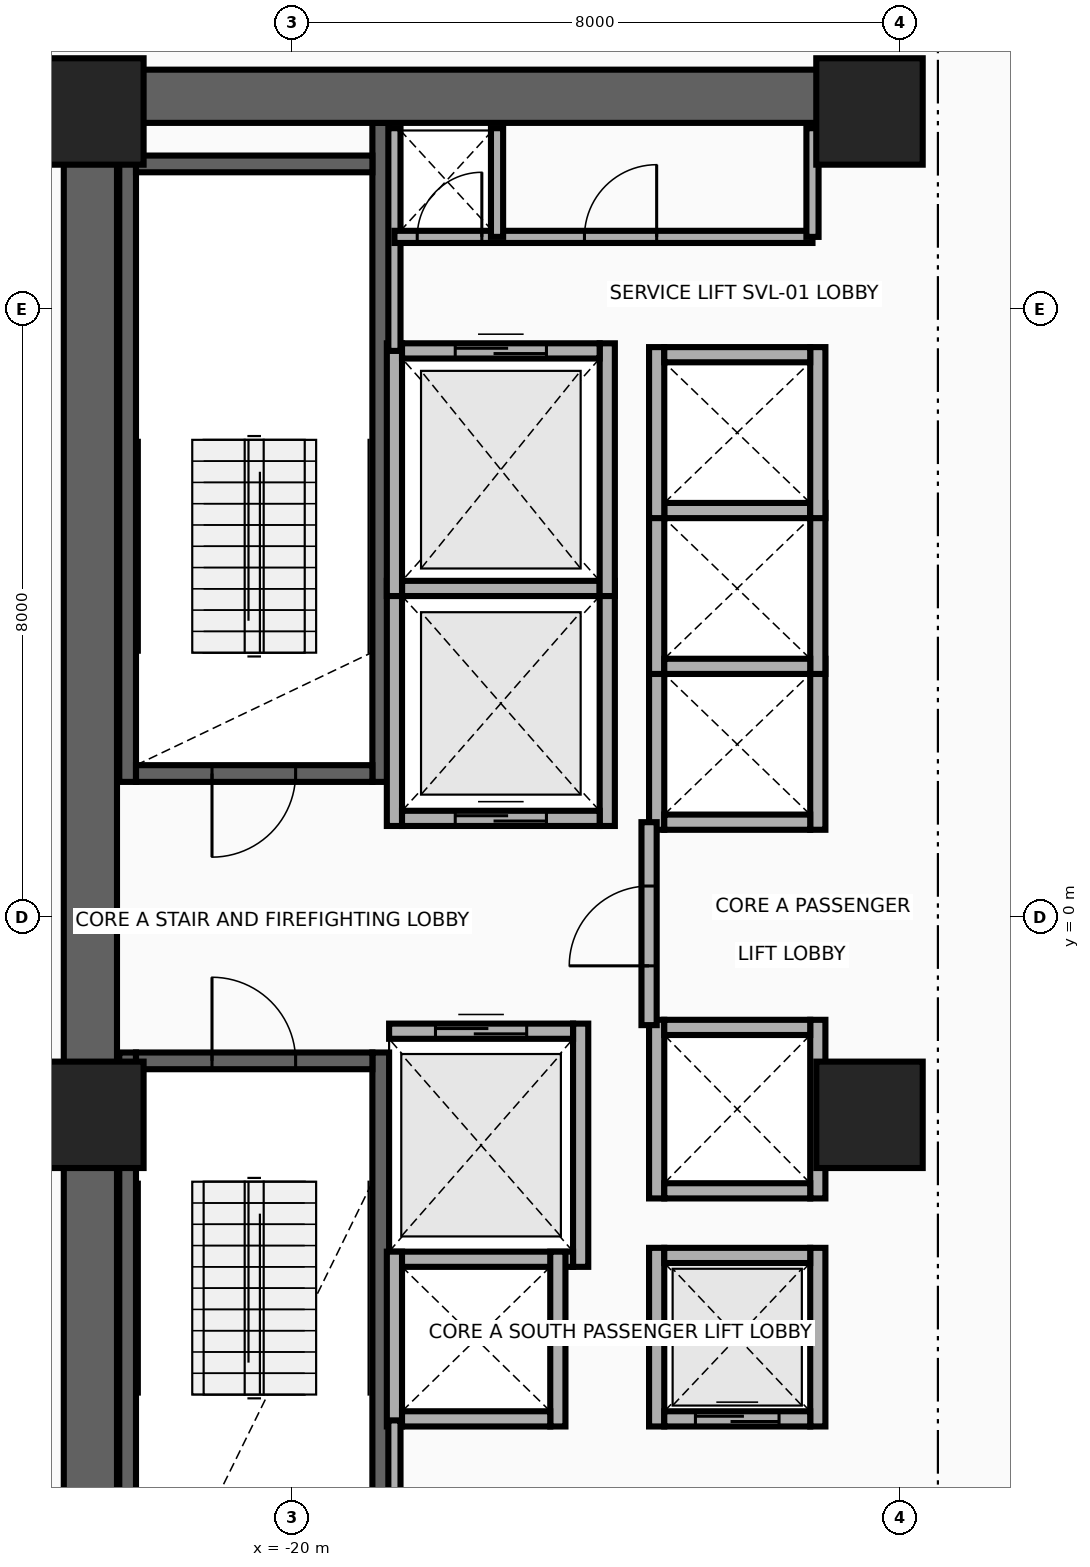
"""IFC4 building model, lengths in metres.
Left out: names, types, materials, properties, quantities, classifications, styles, units other than length and angle.
Written with IfcOpenShell. Run it as: python <this file> out.ifc"""

import sys

from ifc_helpers import new_model, si_unit, direction, frame, frame_2d, origin, origin_2d, place, context, subcontext, project, spatial, rectangle, extrude, source, transform, mapped, element, fill, save


model = new_model("IFC4")
c1 = context("Model", 3, precision=1e-05, world=origin(), true_north=direction((0.0, 1.0)))
c2 = subcontext(c1, "Body", "Model", "MODEL_VIEW")
j1 = project(units=[si_unit("LENGTHUNIT", "METRE"), si_unit("PLANEANGLEUNIT", "RADIAN")], contexts=[c1])
p1 = place(None, origin())
s1 = spatial("IfcSite", under=j1, at=p1, CompositionType="ELEMENT")
p2 = place(p1, origin())
s2 = spatial("IfcBuilding", under=s1, at=p2, CompositionType="ELEMENT")
p3 = place(p2, frame((0.0, 0.0, 81.5)))
s3 = spatial("IfcBuildingStorey", under=s2, at=p3, CompositionType="ELEMENT", Elevation=81.5)
for number, where, z_axis, x_axis in (
    (1, (-22.16, 1.78, 0.0), (0.0, 0.0, 1.0), (0.0, 1.0, 0.0)),
    (2, (-18.83, 1.78, 0.0), (0.0, 0.0, 1.0), (0.0, 1.0, 0.0)),
):
    element("IfcWall", number, at=place(p3, frame(where, z_axis=z_axis, x_axis=x_axis)), inside=s3, PredefinedType="SHEAR", context=c2, shape_type="SweptSolid", body=[
        extrude(rectangle(XDim=8.67, YDim=0.22, at=frame_2d((4.335, 0.0))), origin(), (0.0, 0.0, 1.0), 3.46),
    ])
p4 = place(p3, frame((-22.05, 1.89, 0.0), z_axis=(0.0, 0.0, 1.0), x_axis=(1.0, 0.0, 0.0)))
e3 = element("IfcWall", 3, at=p4, inside=s3, PredefinedType="SHEAR", context=c2, shape_type="SweptSolid", body=[
    extrude(rectangle(XDim=3.11, YDim=0.22, at=frame_2d((1.555, 0.0))), origin(), (0.0, 0.0, 1.0), 3.46),
])
p5 = place(p4, frame((1.0, 0.0, 0.0)))
e4 = element("IfcOpeningElement", 4, at=p5, cuts=e3, PredefinedType="OPENING", context=c2, shape_type="SweptSolid", body=[
    extrude(rectangle(XDim=1.1, YDim=2.15, at=frame_2d((0.55, 1.075))), frame((0.0, 0.125, 0.0), z_axis=(0.0, -1.0, 0.0), x_axis=(1.0, 0.0, 0.0)), (0.0, 0.0, 1.0), 0.25),
])
p6 = place(p3, frame((-22.05, 9.91, 0.0), z_axis=(0.0, 0.0, 1.0), x_axis=(1.0, 0.0, 0.0)))
e5 = element("IfcWall", 5, at=p6, inside=s3, PredefinedType="SHEAR", context=c2, shape_type="SweptSolid", body=[
    extrude(rectangle(XDim=3.11, YDim=0.22, at=frame_2d((1.555, 0.0))), origin(), (0.0, 0.0, 1.0), 3.46),
])
for number, where, z_axis, x_axis in (
    (6, (-22.16, -10.45, 0.0), (0.0, 0.0, 1.0), (0.0, 1.0, 0.0)),
    (7, (-18.83, -10.45, 0.0), (0.0, 0.0, 1.0), (0.0, 1.0, 0.0)),
):
    element("IfcWall", number, at=place(p3, frame(where, z_axis=z_axis, x_axis=x_axis)), inside=s3, PredefinedType="SHEAR", context=c2, shape_type="SweptSolid", body=[
        extrude(rectangle(XDim=8.67, YDim=0.22, at=frame_2d((4.335, 0.0))), origin(), (0.0, 0.0, 1.0), 3.46),
    ])
p7 = place(p3, frame((-22.05, -1.89, 0.0), z_axis=(0.0, 0.0, 1.0), x_axis=(1.0, 0.0, 0.0)))
e8 = element("IfcWall", 8, at=p7, inside=s3, PredefinedType="SHEAR", context=c2, shape_type="SweptSolid", body=[
    extrude(rectangle(XDim=3.11, YDim=0.22, at=frame_2d((1.555, 0.0))), origin(), (0.0, 0.0, 1.0), 3.46),
])
p8 = place(p7, frame((1.0, 0.0, 0.0)))
e9 = element("IfcOpeningElement", 9, at=p8, cuts=e8, PredefinedType="OPENING", context=c2, shape_type="SweptSolid", body=[
    extrude(rectangle(XDim=1.1, YDim=2.15, at=frame_2d((0.55, 1.075))), frame((0.0, 0.125, 0.0), z_axis=(0.0, -1.0, 0.0), x_axis=(1.0, 0.0, 0.0)), (0.0, 0.0, 1.0), 0.25),
])
p9 = place(p3, frame((-22.65, -11.15, 0.0), z_axis=(0.0, 0.0, 1.0), x_axis=(0.0, 1.0, 0.0)))
e10 = element("IfcWall", 10, at=p9, inside=s3, PredefinedType="SHEAR", context=c2, shape_type="SweptSolid", body=[
    extrude(rectangle(XDim=22.3, YDim=0.7, at=frame_2d((11.15, 0.0))), origin(), (0.0, 0.0, 1.0), 3.46),
])
p10 = place(p3, frame((-22.65, 10.8, 0.0), z_axis=(0.0, 0.0, 1.0), x_axis=(1.0, 0.0, 0.0)))
e11 = element("IfcWall", 11, at=p10, inside=s3, PredefinedType="SHEAR", context=c2, shape_type="SweptSolid", body=[
    extrude(rectangle(XDim=10.25, YDim=0.7, at=frame_2d((5.125, 0.0))), origin(), (0.0, 0.0, 1.0), 3.46),
])
m1 = source(origin(), c2, "Body", "SweptSolid", [
    extrude(rectangle(XDim=1.4, YDim=1.4, at=origin_2d()), origin(), (0.0, 0.0, 1.0), 3.7),
])
for number, where, z_axis, x_axis in (
    (12, (-22.65, -2.6, 0.0), (0.0, 0.0, 1.0), (1.0, 0.0, 0.0)),
    (13, (-12.4, -2.6, 0.0), (0.0, 0.0, 1.0), (1.0, 0.0, 0.0)),
    (14, (-22.65, 10.6, 0.0), (0.0, 0.0, 1.0), (1.0, 0.0, 0.0)),
    (15, (-12.4, 10.6, 0.0), (0.0, 0.0, 1.0), (1.0, 0.0, 0.0)),
):
    element("IfcColumn", number, at=place(p3, frame(where, z_axis=z_axis, x_axis=x_axis)), inside=s3, PredefinedType="COLUMN", context=c2, shape_type="MappedRepresentation", body=[
        mapped(m1, transform((0.0, 0.0, 0.0), x_axis=(1.0, 0.0, 0.0), y_axis=(0.0, 1.0, 0.0), z_axis=(0.0, 0.0, 1.0), scale=1.0)),
    ])
for number, where, z_axis, x_axis in (
    (16, (-18.65, 1.2, 0.0), (0.0, 0.0, 1.0), (0.0, 1.0, 0.0)),
    (17, (-15.85, 1.2, 0.0), (0.0, 0.0, 1.0), (0.0, 1.0, 0.0)),
):
    element("IfcWall", number, at=place(p3, frame(where, z_axis=z_axis, x_axis=x_axis)), inside=s3, PredefinedType="MOVABLE", context=c2, shape_type="SweptSolid", body=[
        extrude(rectangle(XDim=3.225, YDim=0.2, at=frame_2d((1.613, 0.0))), origin(), (0.0, 0.0, 1.0), 3.46),
    ])
p11 = place(p3, frame((-18.55, 1.3, 0.0), z_axis=(0.0, 0.0, 1.0), x_axis=(1.0, 0.0, 0.0)))
e18 = element("IfcWall", 18, at=p11, inside=s3, PredefinedType="MOVABLE", context=c2, shape_type="SweptSolid", body=[
    extrude(rectangle(XDim=2.6, YDim=0.2, at=frame_2d((1.3, 0.0))), origin(), (0.0, 0.0, 1.0), 3.46),
])
p12 = place(p11, frame((0.7, 0.0, 0.0)))
e19 = element("IfcOpeningElement", 19, at=p12, cuts=e18, PredefinedType="OPENING", context=c2, shape_type="SweptSolid", body=[
    extrude(rectangle(XDim=1.2, YDim=2.1, at=frame_2d((0.6, 1.05))), frame((0.0, 0.115, 0.0), z_axis=(0.0, -1.0, 0.0), x_axis=(1.0, 0.0, 0.0)), (0.0, 0.0, 1.0), 0.23),
])
p13 = place(p3, frame((-18.55, 4.325, 0.0), z_axis=(0.0, 0.0, 1.0), x_axis=(1.0, 0.0, 0.0)))
e20 = element("IfcWall", 20, at=p13, inside=s3, PredefinedType="MOVABLE", context=c2, shape_type="SweptSolid", body=[
    extrude(rectangle(XDim=2.6, YDim=0.2, at=frame_2d((1.3, 0.0))), origin(), (0.0, 0.0, 1.0), 3.46),
])
p14 = place(p3, frame((-16.2, -4.6, 0.0), z_axis=(0.0, 0.0, 1.0), x_axis=(0.0, 1.0, 0.0)))
e21 = element("IfcWall", 21, at=p14, inside=s3, PredefinedType="MOVABLE", context=c2, shape_type="SweptSolid", body=[
    extrude(rectangle(XDim=3.2, YDim=0.2, at=frame_2d((1.6, 0.0))), origin(), (0.0, 0.0, 1.0), 3.46),
])
p15 = place(p3, frame((-18.72, -4.5, 0.0), z_axis=(0.0, 0.0, 1.0), x_axis=(1.0, 0.0, 0.0)))
e22 = element("IfcWall", 22, at=p15, inside=s3, PredefinedType="MOVABLE", context=c2, shape_type="SweptSolid", body=[
    extrude(rectangle(XDim=2.42, YDim=0.2, at=frame_2d((1.21, 0.0))), origin(), (0.0, 0.0, 1.0), 3.46),
])
p16 = place(p3, frame((-18.72, -1.5, 0.0), z_axis=(0.0, 0.0, 1.0), x_axis=(1.0, 0.0, 0.0)))
e23 = element("IfcWall", 23, at=p16, inside=s3, PredefinedType="MOVABLE", context=c2, shape_type="SweptSolid", body=[
    extrude(rectangle(XDim=2.42, YDim=0.2, at=frame_2d((1.21, 0.0))), origin(), (0.0, 0.0, 1.0), 3.46),
])
p17 = place(p16, frame((0.61, 0.0, 0.0)))
e24 = element("IfcOpeningElement", 24, at=p17, cuts=e23, PredefinedType="OPENING", context=c2, shape_type="SweptSolid", body=[
    extrude(rectangle(XDim=1.2, YDim=2.1, at=frame_2d((0.6, 1.05))), frame((0.0, 0.115, 0.0), z_axis=(0.0, -1.0, 0.0), x_axis=(1.0, 0.0, 0.0)), (0.0, 0.0, 1.0), 0.23),
])
for number, where, z_axis, x_axis in (
    (25, (-18.65, 4.225, 0.0), (0.0, 0.0, 1.0), (0.0, 1.0, 0.0)),
    (26, (-15.85, 4.225, 0.0), (0.0, 0.0, 1.0), (0.0, 1.0, 0.0)),
):
    element("IfcWall", number, at=place(p3, frame(where, z_axis=z_axis, x_axis=x_axis)), inside=s3, PredefinedType="MOVABLE", context=c2, shape_type="SweptSolid", body=[
        extrude(rectangle(XDim=3.325, YDim=0.2, at=frame_2d((1.663, 0.0))), origin(), (0.0, 0.0, 1.0), 3.46),
    ])
p18 = place(p3, frame((-18.55, 7.45, 0.0), z_axis=(0.0, 0.0, 1.0), x_axis=(1.0, 0.0, 0.0)))
e27 = element("IfcWall", 27, at=p18, inside=s3, PredefinedType="MOVABLE", context=c2, shape_type="SweptSolid", body=[
    extrude(rectangle(XDim=2.6, YDim=0.2, at=frame_2d((1.3, 0.0))), origin(), (0.0, 0.0, 1.0), 3.46),
])
p19 = place(p18, frame((0.7, 0.0, 0.0)))
e28 = element("IfcOpeningElement", 28, at=p19, cuts=e27, PredefinedType="OPENING", context=c2, shape_type="SweptSolid", body=[
    extrude(rectangle(XDim=1.2, YDim=2.1, at=frame_2d((0.6, 1.05))), frame((0.0, 0.115, 0.0), z_axis=(0.0, -1.0, 0.0), x_axis=(1.0, 0.0, 0.0)), (0.0, 0.0, 1.0), 0.23),
])
for number, where, z_axis, x_axis in (
    (29, (-15.2, -6.7, 0.0), (0.0, 0.0, 1.0), (0.0, 1.0, 0.0)),
    (30, (-13.08, -6.7, 0.0), (0.0, 0.0, 1.0), (0.0, 1.0, 0.0)),
):
    element("IfcWall", number, at=place(p3, frame(where, z_axis=z_axis, x_axis=x_axis)), inside=s3, PredefinedType="MOVABLE", context=c2, shape_type="SweptSolid", body=[
        extrude(rectangle(XDim=2.35, YDim=0.2, at=frame_2d((1.175, 0.0))), origin(), (0.0, 0.0, 1.0), 3.46),
    ])
p20 = place(p3, frame((-15.1, -6.6, 0.0), z_axis=(0.0, 0.0, 1.0), x_axis=(1.0, 0.0, 0.0)))
e31 = element("IfcWall", 31, at=p20, inside=s3, PredefinedType="MOVABLE", context=c2, shape_type="SweptSolid", body=[
    extrude(rectangle(XDim=1.92, YDim=0.2, at=frame_2d((0.96, 0.0))), origin(), (0.0, 0.0, 1.0), 3.46),
])
p21 = place(p20, frame((0.41, 0.0, 0.0)))
e32 = element("IfcOpeningElement", 32, at=p21, cuts=e31, PredefinedType="OPENING", context=c2, shape_type="SweptSolid", body=[
    extrude(rectangle(XDim=1.1, YDim=2.1, at=frame_2d((0.55, 1.05))), frame((0.0, 0.115, 0.0), z_axis=(0.0, -1.0, 0.0), x_axis=(1.0, 0.0, 0.0)), (0.0, 0.0, 1.0), 0.23),
])
p22 = place(p3, frame((-15.1, -4.45, 0.0), z_axis=(0.0, 0.0, 1.0), x_axis=(1.0, 0.0, 0.0)))
e33 = element("IfcWall", 33, at=p22, inside=s3, PredefinedType="MOVABLE", context=c2, shape_type="SweptSolid", body=[
    extrude(rectangle(XDim=1.92, YDim=0.2, at=frame_2d((0.96, 0.0))), origin(), (0.0, 0.0, 1.0), 3.46),
])
for number, where, z_axis, x_axis in (
    (34, (-15.2, 1.15, 0.0), (0.0, 0.0, 1.0), (0.0, 1.0, 0.0)),
    (35, (-13.08, 1.15, 0.0), (0.0, 0.0, 1.0), (0.0, 1.0, 0.0)),
):
    element("IfcWall", number, at=place(p3, frame(where, z_axis=z_axis, x_axis=x_axis)), inside=s3, PredefinedType="MOVABLE", context=c2, shape_type="SweptSolid", body=[
        extrude(rectangle(XDim=2.25, YDim=0.2, at=frame_2d((1.125, 0.0))), origin(), (0.0, 0.0, 1.0), 3.46),
    ])
p23 = place(p3, frame((-15.1, 1.25, 0.0), z_axis=(0.0, 0.0, 1.0), x_axis=(1.0, 0.0, 0.0)))
e36 = element("IfcWall", 36, at=p23, inside=s3, PredefinedType="MOVABLE", context=c2, shape_type="SweptSolid", body=[
    extrude(rectangle(XDim=1.92, YDim=0.2, at=frame_2d((0.96, 0.0))), origin(), (0.0, 0.0, 1.0), 3.46),
])
for number, where, z_axis, x_axis in (
    (37, (-15.2, 3.2, 0.0), (0.0, 0.0, 1.0), (0.0, 1.0, 0.0)),
    (38, (-13.08, 3.2, 0.0), (0.0, 0.0, 1.0), (0.0, 1.0, 0.0)),
):
    element("IfcWall", number, at=place(p3, frame(where, z_axis=z_axis, x_axis=x_axis)), inside=s3, PredefinedType="MOVABLE", context=c2, shape_type="SweptSolid", body=[
        extrude(rectangle(XDim=2.25, YDim=0.2, at=frame_2d((1.125, 0.0))), origin(), (0.0, 0.0, 1.0), 3.46),
    ])
for number, where, z_axis, x_axis in (
    (39, (-15.1, 3.3, 0.0), (0.0, 0.0, 1.0), (1.0, 0.0, 0.0)),
    (40, (-15.1, 5.35, 0.0), (0.0, 0.0, 1.0), (1.0, 0.0, 0.0)),
):
    element("IfcWall", number, at=place(p3, frame(where, z_axis=z_axis, x_axis=x_axis)), inside=s3, PredefinedType="MOVABLE", context=c2, shape_type="SweptSolid", body=[
        extrude(rectangle(XDim=1.92, YDim=0.2, at=frame_2d((0.96, 0.0))), origin(), (0.0, 0.0, 1.0), 3.46),
    ])
for number, where, z_axis, x_axis in (
    (41, (-15.2, 5.25, 0.0), (0.0, 0.0, 1.0), (0.0, 1.0, 0.0)),
    (42, (-13.08, 5.25, 0.0), (0.0, 0.0, 1.0), (0.0, 1.0, 0.0)),
):
    element("IfcWall", number, at=place(p3, frame(where, z_axis=z_axis, x_axis=x_axis)), inside=s3, PredefinedType="MOVABLE", context=c2, shape_type="SweptSolid", body=[
        extrude(rectangle(XDim=2.25, YDim=0.2, at=frame_2d((1.125, 0.0))), origin(), (0.0, 0.0, 1.0), 3.46),
    ])
p24 = place(p3, frame((-15.1, 7.4, 0.0), z_axis=(0.0, 0.0, 1.0), x_axis=(1.0, 0.0, 0.0)))
e43 = element("IfcWall", 43, at=p24, inside=s3, PredefinedType="MOVABLE", context=c2, shape_type="SweptSolid", body=[
    extrude(rectangle(XDim=1.92, YDim=0.2, at=frame_2d((0.96, 0.0))), origin(), (0.0, 0.0, 1.0), 3.46),
])
for number, where, z_axis, x_axis in (
    (44, (-18.65, -6.7, 0.0), (0.0, 0.0, 1.0), (0.0, 1.0, 0.0)),
    (45, (-16.5, -6.7, 0.0), (0.0, 0.0, 1.0), (0.0, 1.0, 0.0)),
):
    element("IfcWall", number, at=place(p3, frame(where, z_axis=z_axis, x_axis=x_axis)), inside=s3, PredefinedType="MOVABLE", context=c2, shape_type="SweptSolid", body=[
        extrude(rectangle(XDim=2.3, YDim=0.2, at=frame_2d((1.15, 0.0))), origin(), (0.0, 0.0, 1.0), 3.46),
    ])
p25 = place(p3, frame((-18.55, -6.6, 0.0), z_axis=(0.0, 0.0, 1.0), x_axis=(1.0, 0.0, 0.0)))
e46 = element("IfcWall", 46, at=p25, inside=s3, PredefinedType="MOVABLE", context=c2, shape_type="SweptSolid", body=[
    extrude(rectangle(XDim=1.95, YDim=0.2, at=frame_2d((0.975, 0.0))), origin(), (0.0, 0.0, 1.0), 3.46),
])
for number, where, z_axis, x_axis in (
    (47, (-15.2, -3.7, 0.0), (0.0, 0.0, 1.0), (0.0, 1.0, 0.0)),
    (48, (-13.08, -3.7, 0.0), (0.0, 0.0, 1.0), (0.0, 1.0, 0.0)),
):
    element("IfcWall", number, at=place(p3, frame(where, z_axis=z_axis, x_axis=x_axis)), inside=s3, PredefinedType="MOVABLE", context=c2, shape_type="SweptSolid", body=[
        extrude(rectangle(XDim=2.35, YDim=0.2, at=frame_2d((1.175, 0.0))), origin(), (0.0, 0.0, 1.0), 3.46),
    ])
for number, where, z_axis, x_axis in (
    (49, (-15.1, -3.6, 0.0), (0.0, 0.0, 1.0), (1.0, 0.0, 0.0)),
    (50, (-15.1, -1.45, 0.0), (0.0, 0.0, 1.0), (1.0, 0.0, 0.0)),
):
    element("IfcWall", number, at=place(p3, frame(where, z_axis=z_axis, x_axis=x_axis)), inside=s3, PredefinedType="MOVABLE", context=c2, shape_type="SweptSolid", body=[
        extrude(rectangle(XDim=1.92, YDim=0.2, at=frame_2d((0.96, 0.0))), origin(), (0.0, 0.0, 1.0), 3.46),
    ])
p26 = place(p3, frame((-15.3, -1.42, 0.0), z_axis=(0.0, 0.0, 1.0), x_axis=(0.0, 1.0, 0.0)))
e51 = element("IfcWall", 51, at=p26, inside=s3, PredefinedType="PARTITIONING", context=c2, shape_type="SweptSolid", body=[
    extrude(rectangle(XDim=2.67, YDim=0.2, at=frame_2d((1.335, 0.0))), origin(), (0.0, 0.0, 1.0), 3.46),
])
p27 = place(p26, frame((0.78, 0.0, 0.0)))
e52 = element("IfcOpeningElement", 52, at=p27, cuts=e51, PredefinedType="OPENING", context=c2, shape_type="SweptSolid", body=[
    extrude(rectangle(XDim=1.05, YDim=2.15, at=frame_2d((0.525, 1.075))), frame((0.0, 0.115, 0.0), z_axis=(0.0, -1.0, 0.0), x_axis=(1.0, 0.0, 0.0)), (0.0, 0.0, 1.0), 0.23),
])
p28 = place(p3, frame((-18.65, 7.45, 0.0), z_axis=(0.0, 0.0, 1.0), x_axis=(0.0, 1.0, 0.0)))
e53 = element("IfcWall", 53, at=p28, inside=s3, PredefinedType="PARTITIONING", context=c2, shape_type="SweptSolid", body=[
    extrude(rectangle(XDim=2.93, YDim=0.16, at=frame_2d((1.465, 0.0))), origin(), (0.0, 0.0, 1.0), 3.46),
])
p29 = place(p3, frame((-18.65, -8.18, 0.0), z_axis=(0.0, 0.0, 1.0), x_axis=(0.0, 1.0, 0.0)))
e54 = element("IfcWall", 54, at=p29, inside=s3, PredefinedType="PARTITIONING", context=c2, shape_type="SweptSolid", body=[
    extrude(rectangle(XDim=1.56, YDim=0.16, at=frame_2d((0.78, 0.0))), origin(), (0.0, 0.0, 1.0), 3.46),
])
p30 = place(p3, frame((-18.65, 8.95, 0.0), z_axis=(0.0, 0.0, 1.0), x_axis=(1.0, 0.0, 0.0)))
e55 = element("IfcWall", 55, at=p30, inside=s3, PredefinedType="PARTITIONING", context=c2, shape_type="SweptSolid", body=[
    extrude(rectangle(XDim=5.5, YDim=0.16, at=frame_2d((2.75, 0.0))), origin(), (0.0, 0.0, 1.0), 3.46),
])
p31 = place(p30, frame((0.3, 0.0, 0.0)))
e56 = element("IfcOpeningElement", 56, at=p31, cuts=e55, PredefinedType="OPENING", context=c2, shape_type="SweptSolid", body=[
    extrude(rectangle(XDim=0.85, YDim=2.05, at=frame_2d((0.425, 1.025))), frame((0.0, 0.095, 0.0), z_axis=(0.0, -1.0, 0.0), x_axis=(1.0, 0.0, 0.0)), (0.0, 0.0, 1.0), 0.19),
])
p32 = place(p30, frame((2.5, 0.0, 0.0)))
e57 = element("IfcOpeningElement", 57, at=p32, cuts=e55, PredefinedType="OPENING", context=c2, shape_type="SweptSolid", body=[
    extrude(rectangle(XDim=0.95, YDim=2.15, at=frame_2d((0.475, 1.075))), frame((0.0, 0.095, 0.0), z_axis=(0.0, -1.0, 0.0), x_axis=(1.0, 0.0, 0.0)), (0.0, 0.0, 1.0), 0.19),
])
for number, where, z_axis, x_axis in (
    (58, (-13.15, 8.95, 0.0), (0.0, 0.0, 1.0), (0.0, 1.0, 0.0)),
    (59, (-17.3, 8.95, 0.0), (0.0, 0.0, 1.0), (0.0, 1.0, 0.0)),
):
    element("IfcWall", number, at=place(p3, frame(where, z_axis=z_axis, x_axis=x_axis)), inside=s3, PredefinedType="PARTITIONING", context=c2, shape_type="SweptSolid", body=[
        extrude(rectangle(XDim=1.43, YDim=0.16, at=frame_2d((0.715, 0.0))), origin(), (0.0, 0.0, 1.0), 3.46),
    ])
p33 = place(p12, origin())
e60 = element("IfcDoor", 60, at=p33, inside=s3, OperationType="DOUBLE_DOOR_SLIDING", PredefinedType="DOOR", context=c2, shape_type="SweptSolid", body=[
    extrude(rectangle(XDim=1.2, YDim=2.1, at=frame_2d((0.6, 1.05))), frame((0.0, 0.025, 0.0), z_axis=(0.0, -1.0, 0.0), x_axis=(1.0, 0.0, 0.0)), (0.0, 0.0, 1.0), 0.05),
])
fill(e19, e60)
p34 = place(p17, origin())
e61 = element("IfcDoor", 61, at=p34, inside=s3, OperationType="DOUBLE_DOOR_SLIDING", PredefinedType="DOOR", context=c2, shape_type="SweptSolid", body=[
    extrude(rectangle(XDim=1.2, YDim=2.1, at=frame_2d((0.6, 1.05))), frame((0.0, 0.025, 0.0), z_axis=(0.0, -1.0, 0.0), x_axis=(1.0, 0.0, 0.0)), (0.0, 0.0, 1.0), 0.05),
])
fill(e24, e61)
p35 = place(p19, origin())
e62 = element("IfcDoor", 62, at=p35, inside=s3, OperationType="DOUBLE_DOOR_SLIDING", PredefinedType="DOOR", context=c2, shape_type="SweptSolid", body=[
    extrude(rectangle(XDim=1.2, YDim=2.1, at=frame_2d((0.6, 1.05))), frame((0.0, 0.025, 0.0), z_axis=(0.0, -1.0, 0.0), x_axis=(1.0, 0.0, 0.0)), (0.0, 0.0, 1.0), 0.05),
])
fill(e28, e62)
p36 = place(p21, origin())
e63 = element("IfcDoor", 63, at=p36, inside=s3, OperationType="DOUBLE_DOOR_SLIDING", PredefinedType="DOOR", context=c2, shape_type="SweptSolid", body=[
    extrude(rectangle(XDim=1.1, YDim=2.1, at=frame_2d((0.55, 1.05))), frame((0.0, 0.025, 0.0), z_axis=(0.0, -1.0, 0.0), x_axis=(1.0, 0.0, 0.0)), (0.0, 0.0, 1.0), 0.05),
])
fill(e32, e63)
p37 = place(p27, origin())
e64 = element("IfcDoor", 64, at=p37, inside=s3, OperationType="SINGLE_SWING_RIGHT", PredefinedType="DOOR", context=c2, shape_type="SweptSolid", body=[
    extrude(rectangle(XDim=1.05, YDim=2.15, at=frame_2d((0.525, 1.075))), frame((0.0, 0.025, 0.0), z_axis=(0.0, -1.0, 0.0), x_axis=(1.0, 0.0, 0.0)), (0.0, 0.0, 1.0), 0.05),
])
fill(e52, e64)
p38 = place(p5, frame((1.1, 0.0, 0.0), z_axis=(0.0, 0.0, 1.0), x_axis=(-1.0, 0.0, 0.0)))
e65 = element("IfcDoor", 65, at=p38, inside=s3, OperationType="SINGLE_SWING_LEFT", PredefinedType="DOOR", context=c2, shape_type="SweptSolid", body=[
    extrude(rectangle(XDim=1.1, YDim=2.15, at=frame_2d((0.55, 1.075))), frame((0.0, 0.025, 0.0), z_axis=(0.0, -1.0, 0.0), x_axis=(1.0, 0.0, 0.0)), (0.0, 0.0, 1.0), 0.05),
])
fill(e4, e65)
p39 = place(p8, origin())
e66 = element("IfcDoor", 66, at=p39, inside=s3, OperationType="SINGLE_SWING_RIGHT", PredefinedType="DOOR", context=c2, shape_type="SweptSolid", body=[
    extrude(rectangle(XDim=1.1, YDim=2.15, at=frame_2d((0.55, 1.075))), frame((0.0, 0.025, 0.0), z_axis=(0.0, -1.0, 0.0), x_axis=(1.0, 0.0, 0.0)), (0.0, 0.0, 1.0), 0.05),
])
fill(e9, e66)
p40 = place(p31, origin())
e67 = element("IfcDoor", 67, at=p40, inside=s3, OperationType="SINGLE_SWING_LEFT", PredefinedType="DOOR", context=c2, shape_type="SweptSolid", body=[
    extrude(rectangle(XDim=0.85, YDim=2.05, at=frame_2d((0.425, 1.025))), frame((0.0, 0.025, 0.0), z_axis=(0.0, -1.0, 0.0), x_axis=(1.0, 0.0, 0.0)), (0.0, 0.0, 1.0), 0.05),
])
fill(e56, e67)
p41 = place(p32, origin())
e68 = element("IfcDoor", 68, at=p41, inside=s3, OperationType="SINGLE_SWING_RIGHT", PredefinedType="DOOR", context=c2, shape_type="SweptSolid", body=[
    extrude(rectangle(XDim=0.95, YDim=2.15, at=frame_2d((0.475, 1.075))), frame((0.0, 0.025, 0.0), z_axis=(0.0, -1.0, 0.0), x_axis=(1.0, 0.0, 0.0)), (0.0, 0.0, 1.0), 0.05),
])
fill(e57, e68)
save(model, sys.argv[1])
